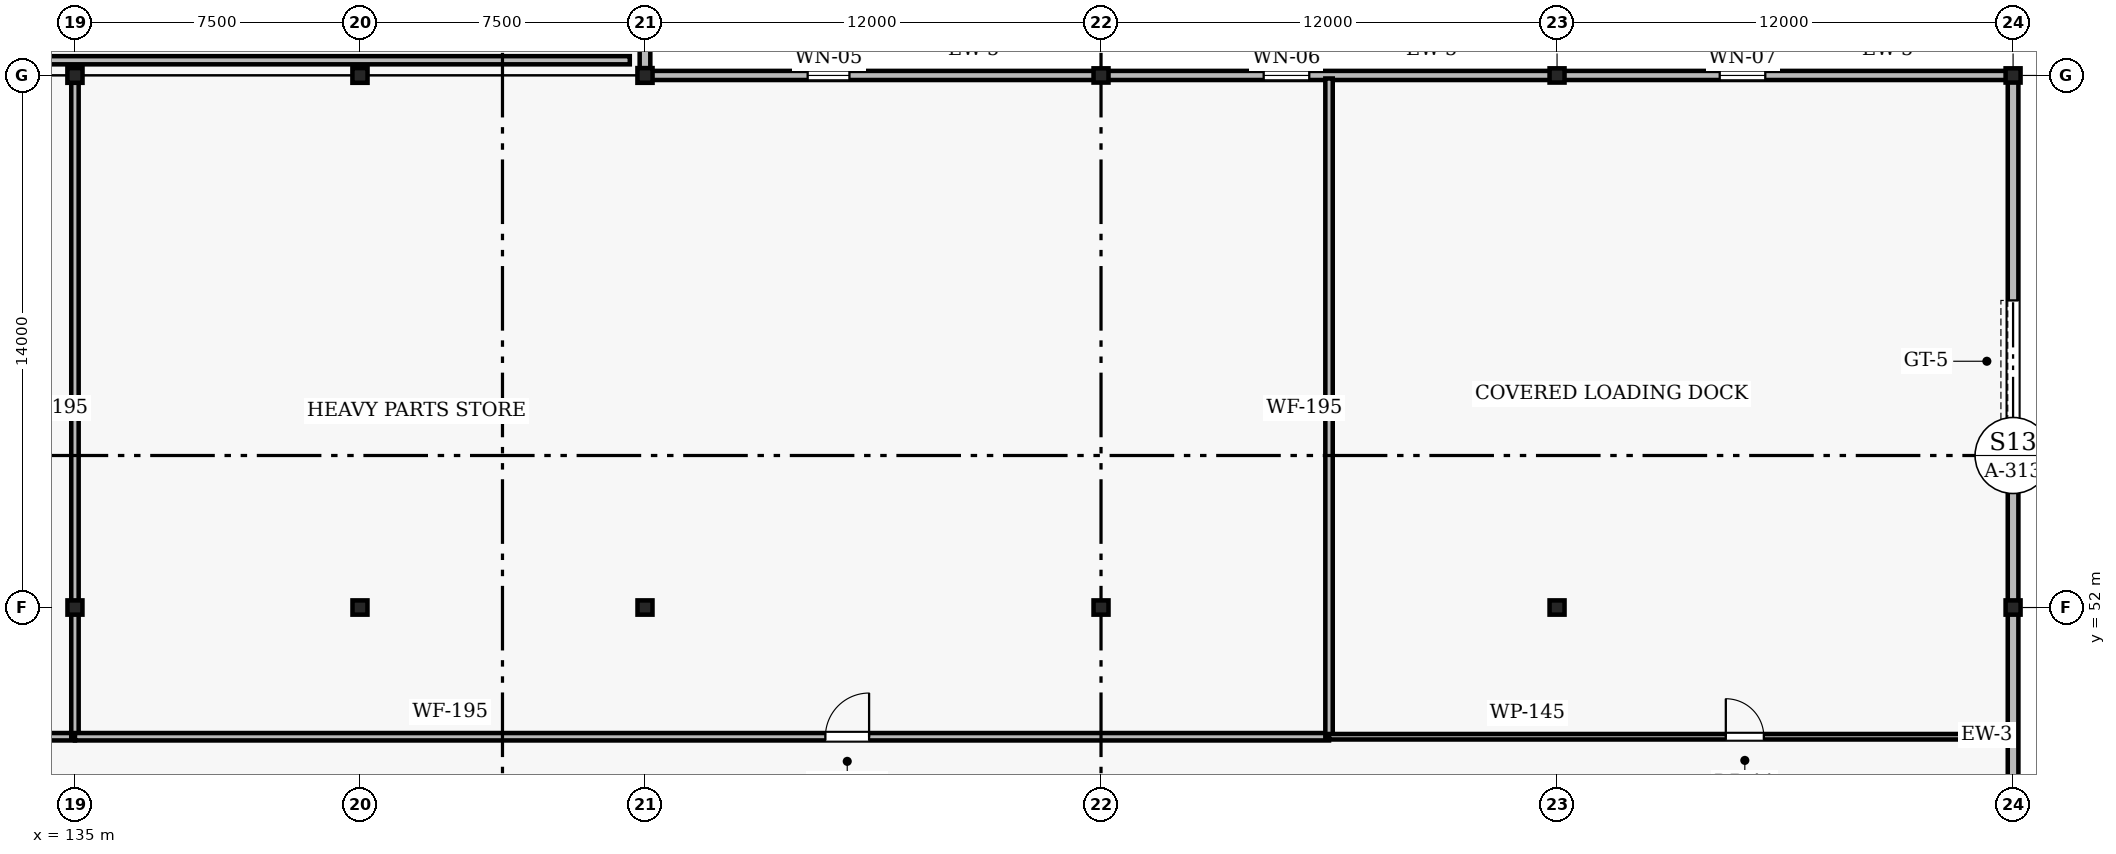
"""IFC4 building model, lengths in metres.
Left out: names, types, materials, properties, quantities, classifications, styles, units other than length and angle.
Written with IfcOpenShell. Run it as: python <this file> out.ifc"""

import sys

from ifc_helpers import new_model, si_unit, direction, frame, frame_2d, origin, origin_2d, place, context, subcontext, project, spatial, rectangle, i_section, extrude, element, fill, save


model = new_model("IFC4")
c1 = context("Model", 3, precision=1e-05, world=origin(), true_north=direction((0.0, 1.0)))
c2 = subcontext(c1, "Body", "Model", "MODEL_VIEW")
j1 = project(units=[si_unit("LENGTHUNIT", "METRE"), si_unit("PLANEANGLEUNIT", "RADIAN")], contexts=[c1])
p1 = place(None, origin())
s1 = spatial("IfcSite", under=j1, at=p1, CompositionType="ELEMENT")
p2 = place(p1, origin())
s2 = spatial("IfcBuilding", under=s1, at=p2, CompositionType="ELEMENT")
p3 = place(p2, origin())
s3 = spatial("IfcBuildingStorey", under=s2, at=p3, CompositionType="ELEMENT", Elevation=0.0)
p4 = place(p3, frame((135.0, 52.0, 0.0), z_axis=(0.0, 0.0, 1.0), x_axis=(1.0, 0.0, 0.0)))
e1 = element("IfcColumn", 1, at=p4, inside=s3, PredefinedType="COLUMN", context=c2, shape_type="SweptSolid", body=[
    extrude(i_section(OverallWidth=0.394, OverallDepth=0.375, WebThickness=0.021, FlangeThickness=0.033, FilletRadius=0.018, at=origin_2d()), origin(), (0.0, 0.0, 1.0), 4.5),
])
p5 = place(p3, frame((135.0, 66.0, 0.0), z_axis=(0.0, 0.0, 1.0), x_axis=(1.0, 0.0, 0.0)))
e2 = element("IfcColumn", 2, at=p5, inside=s3, PredefinedType="COLUMN", context=c2, shape_type="SweptSolid", body=[
    extrude(i_section(OverallWidth=0.398, OverallDepth=0.387, WebThickness=0.024, FlangeThickness=0.04, FilletRadius=0.018, at=origin_2d()), origin(), (0.0, 0.0, 1.0), 4.5),
])
p6 = place(p3, frame((142.5, 52.0, 0.0), z_axis=(0.0, 0.0, 1.0), x_axis=(1.0, 0.0, 0.0)))
e3 = element("IfcColumn", 3, at=p6, inside=s3, PredefinedType="COLUMN", context=c2, shape_type="SweptSolid", body=[
    extrude(i_section(OverallWidth=0.394, OverallDepth=0.375, WebThickness=0.021, FlangeThickness=0.033, FilletRadius=0.018, at=origin_2d()), origin(), (0.0, 0.0, 1.0), 4.5),
])
p7 = place(p3, frame((142.5, 66.0, 0.0), z_axis=(0.0, 0.0, 1.0), x_axis=(1.0, 0.0, 0.0)))
e4 = element("IfcColumn", 4, at=p7, inside=s3, PredefinedType="COLUMN", context=c2, shape_type="SweptSolid", body=[
    extrude(i_section(OverallWidth=0.398, OverallDepth=0.387, WebThickness=0.024, FlangeThickness=0.04, FilletRadius=0.018, at=origin_2d()), origin(), (0.0, 0.0, 1.0), 4.5),
])
p8 = place(p3, frame((150.0, 52.0, 0.0), z_axis=(0.0, 0.0, 1.0), x_axis=(1.0, 0.0, 0.0)))
e5 = element("IfcColumn", 5, at=p8, inside=s3, PredefinedType="COLUMN", context=c2, shape_type="SweptSolid", body=[
    extrude(i_section(OverallWidth=0.394, OverallDepth=0.375, WebThickness=0.021, FlangeThickness=0.033, FilletRadius=0.018, at=origin_2d()), origin(), (0.0, 0.0, 1.0), 4.5),
])
p9 = place(p3, frame((150.0, 66.0, 0.0), z_axis=(0.0, 0.0, 1.0), x_axis=(1.0, 0.0, 0.0)))
e6 = element("IfcColumn", 6, at=p9, inside=s3, PredefinedType="COLUMN", context=c2, shape_type="SweptSolid", body=[
    extrude(i_section(OverallWidth=0.398, OverallDepth=0.387, WebThickness=0.024, FlangeThickness=0.04, FilletRadius=0.018, at=origin_2d()), origin(), (0.0, 0.0, 1.0), 4.5),
])
for number, where, z_axis, x_axis in (
    (7, (162.0, 52.0, 0.0), (0.0, 0.0, 1.0), (1.0, 0.0, 0.0)),
    (8, (162.0, 66.0, 0.0), (0.0, 0.0, 1.0), (1.0, 0.0, 0.0)),
    (9, (174.0, 52.0, 0.0), (0.0, 0.0, 1.0), (1.0, 0.0, 0.0)),
    (10, (174.0, 66.0, 0.0), (0.0, 0.0, 1.0), (1.0, 0.0, 0.0)),
    (11, (186.0, 52.0, 0.0), (0.0, 0.0, 1.0), (1.0, 0.0, 0.0)),
    (12, (186.0, 66.0, 0.0), (0.0, 0.0, 1.0), (1.0, 0.0, 0.0)),
):
    element("IfcColumn", number, at=place(p3, frame(where, z_axis=z_axis, x_axis=x_axis)), inside=s3, PredefinedType="COLUMN", context=c2, shape_type="SweptSolid", body=[
        extrude(i_section(OverallWidth=0.394, OverallDepth=0.375, WebThickness=0.021, FlangeThickness=0.033, FilletRadius=0.018, at=origin_2d()), origin(), (0.0, 0.0, 1.0), 4.5),
    ])
p10 = place(p3, frame((150.0, 66.08, 0.0), z_axis=(0.0, 0.0, 1.0), x_axis=(0.0, 1.0, 0.0)))
e13 = element("IfcWall", 13, at=p10, inside=s3, PredefinedType="SOLIDWALL", context=c2, shape_type="SweptSolid", body=[
    extrude(rectangle(XDim=5.92, YDim=0.28, at=frame_2d((2.96, 0.0))), origin(), (0.0, 0.0, 1.0), 3.65),
])
p11 = place(p10, frame((1.18, 0.0, 0.0)))
e14 = element("IfcOpeningElement", 14, at=p11, cuts=e13, PredefinedType="OPENING", context=c2, shape_type="SweptSolid", body=[
    extrude(rectangle(XDim=3.2, YDim=3.1, at=frame_2d((1.6, 1.55))), frame((0.0, 0.15, 0.0), z_axis=(0.0, -1.0, 0.0), x_axis=(1.0, 0.0, 0.0)), (0.0, 0.0, 1.0), 0.3),
])
p12 = place(p3, frame((186.0, 38.08, 0.0), z_axis=(0.0, 0.0, 1.0), x_axis=(0.0, 1.0, 0.0)))
e15 = element("IfcWall", 15, at=p12, inside=s3, PredefinedType="SOLIDWALL", context=c2, shape_type="SweptSolid", body=[
    extrude(rectangle(XDim=13.84, YDim=0.28, at=frame_2d((6.92, 0.0))), origin(), (0.0, 0.0, 1.0), 3.633),
])
p13 = place(p12, frame((5.5, 0.0, 0.0)))
e16 = element("IfcOpeningElement", 16, at=p13, cuts=e15, PredefinedType="OPENING", context=c2, shape_type="SweptSolid", body=[
    extrude(rectangle(XDim=1.8, YDim=2.2, at=frame_2d((0.9, 1.1))), frame((0.0, 0.15, 0.0), z_axis=(0.0, -1.0, 0.0), x_axis=(1.0, 0.0, 0.0)), (0.0, 0.0, 1.0), 0.3),
])
p14 = place(p3, frame((186.0, 52.08, 0.0), z_axis=(0.0, 0.0, 1.0), x_axis=(0.0, 1.0, 0.0)))
e17 = element("IfcWall", 17, at=p14, inside=s3, PredefinedType="SOLIDWALL", context=c2, shape_type="SweptSolid", body=[
    extrude(rectangle(XDim=13.84, YDim=0.28, at=frame_2d((6.92, 0.0))), origin(), (0.0, 0.0, 1.0), 3.633),
])
p15 = place(p14, frame((4.8, 0.0, 0.0)))
e18 = element("IfcOpeningElement", 18, at=p15, cuts=e17, PredefinedType="OPENING", context=c2, shape_type="SweptSolid", body=[
    extrude(rectangle(XDim=3.2, YDim=3.1, at=frame_2d((1.6, 1.55))), frame((0.0, 0.15, 0.0), z_axis=(0.0, -1.0, 0.0), x_axis=(1.0, 0.0, 0.0)), (0.0, 0.0, 1.0), 0.3),
])
p16 = place(p3, frame((150.08, 66.0, 0.0), z_axis=(0.0, 0.0, 1.0), x_axis=(1.0, 0.0, 0.0)))
e19 = element("IfcWall", 19, at=p16, inside=s3, PredefinedType="SOLIDWALL", context=c2, shape_type="SweptSolid", body=[
    extrude(rectangle(XDim=11.84, YDim=0.24, at=frame_2d((5.92, 0.0))), origin(), (0.0, 0.0, 1.0), 3.785),
])
p17 = place(p16, frame((4.2, 0.0, 1.15)))
e20 = element("IfcOpeningElement", 20, at=p17, cuts=e19, PredefinedType="OPENING", context=c2, shape_type="SweptSolid", body=[
    extrude(rectangle(XDim=1.1, YDim=1.5, at=frame_2d((0.55, 0.75))), frame((0.0, 0.13, 0.0), z_axis=(0.0, -1.0, 0.0), x_axis=(1.0, 0.0, 0.0)), (0.0, 0.0, 1.0), 0.26),
])
p18 = place(p3, frame((162.08, 66.0, 0.0), z_axis=(0.0, 0.0, 1.0), x_axis=(1.0, 0.0, 0.0)))
e21 = element("IfcWall", 21, at=p18, inside=s3, PredefinedType="SOLIDWALL", context=c2, shape_type="SweptSolid", body=[
    extrude(rectangle(XDim=11.84, YDim=0.24, at=frame_2d((5.92, 0.0))), origin(), (0.0, 0.0, 1.0), 3.785),
])
p19 = place(p18, frame((4.2, 0.0, 1.15)))
e22 = element("IfcOpeningElement", 22, at=p19, cuts=e21, PredefinedType="OPENING", context=c2, shape_type="SweptSolid", body=[
    extrude(rectangle(XDim=1.2, YDim=1.1, at=frame_2d((0.6, 0.55))), frame((0.0, 0.13, 0.0), z_axis=(0.0, -1.0, 0.0), x_axis=(1.0, 0.0, 0.0)), (0.0, 0.0, 1.0), 0.26),
])
p20 = place(p3, frame((174.08, 66.0, 0.0), z_axis=(0.0, 0.0, 1.0), x_axis=(1.0, 0.0, 0.0)))
e23 = element("IfcWall", 23, at=p20, inside=s3, PredefinedType="SOLIDWALL", context=c2, shape_type="SweptSolid", body=[
    extrude(rectangle(XDim=11.84, YDim=0.24, at=frame_2d((5.92, 0.0))), origin(), (0.0, 0.0, 1.0), 3.785),
])
p21 = place(p20, frame((4.2, 0.0, 1.15)))
e24 = element("IfcOpeningElement", 24, at=p21, cuts=e23, PredefinedType="OPENING", context=c2, shape_type="SweptSolid", body=[
    extrude(rectangle(XDim=1.2, YDim=1.35, at=frame_2d((0.6, 0.675))), frame((0.0, 0.13, 0.0), z_axis=(0.0, -1.0, 0.0), x_axis=(1.0, 0.0, 0.0)), (0.0, 0.0, 1.0), 0.26),
])
p22 = place(p3, frame((90.0, 66.4, 0.0), z_axis=(0.0, 0.0, 1.0), x_axis=(1.0, 0.0, 0.0)))
e25 = element("IfcWall", 25, at=p22, inside=s3, PredefinedType="PARTITIONING", context=c2, shape_type="SweptSolid", body=[
    extrude(rectangle(XDim=59.6, YDim=0.215, at=frame_2d((29.8, 0.0))), origin(), (0.0, 0.0, 1.0), 3.7),
])
p23 = place(p22, frame((36.239, 0.0, 0.0)))
e26 = element("IfcOpeningElement", 26, at=p23, cuts=e25, PredefinedType="OPENING", context=c2, shape_type="SweptSolid", body=[
    extrude(rectangle(XDim=1.15, YDim=2.15, at=frame_2d((0.575, 1.075))), frame((0.0, 0.117, 0.0), z_axis=(0.0, -1.0, 0.0), x_axis=(1.0, 0.0, 0.0)), (0.0, 0.0, 1.0), 0.235),
])
p24 = place(p3, frame((105.16, 48.6, 0.0), z_axis=(0.0, 0.0, 1.0), x_axis=(1.0, 0.0, 0.0)))
e27 = element("IfcWall", 27, at=p24, inside=s3, PredefinedType="PARTITIONING", context=c2, shape_type="SweptSolid", body=[
    extrude(rectangle(XDim=29.84, YDim=0.195, at=frame_2d((14.92, 0.0))), origin(), (0.0, 0.0, 1.0), 3.7),
])
p25 = place(p24, frame((17.788, 0.0, 0.0)))
e28 = element("IfcOpeningElement", 28, at=p25, cuts=e27, PredefinedType="OPENING", context=c2, shape_type="SweptSolid", body=[
    extrude(rectangle(XDim=1.15, YDim=2.15, at=frame_2d((0.575, 1.075))), frame((0.0, 0.107, 0.0), z_axis=(0.0, -1.0, 0.0), x_axis=(1.0, 0.0, 0.0)), (0.0, 0.0, 1.0), 0.215),
])
p26 = place(p3, frame((135.0, 48.6, 0.0), z_axis=(0.0, 0.0, 1.0), x_axis=(0.0, 1.0, 0.0)))
e29 = element("IfcWall", 29, at=p26, inside=s3, PredefinedType="PARTITIONING", context=c2, shape_type="SweptSolid", body=[
    extrude(rectangle(XDim=17.32, YDim=0.195, at=frame_2d((8.66, 0.0))), origin(), (0.0, 0.0, 1.0), 3.633),
])
p27 = place(p3, frame((135.0, 48.6, 0.0), z_axis=(0.0, 0.0, 1.0), x_axis=(1.0, 0.0, 0.0)))
e30 = element("IfcWall", 30, at=p27, inside=s3, PredefinedType="PARTITIONING", context=c2, shape_type="SweptSolid", body=[
    extrude(rectangle(XDim=33.0, YDim=0.195, at=frame_2d((16.5, 0.0))), origin(), (0.0, 0.0, 1.0), 3.7),
])
p28 = place(p27, frame((19.747, 0.0, 0.0)))
e31 = element("IfcOpeningElement", 31, at=p28, cuts=e30, PredefinedType="OPENING", context=c2, shape_type="SweptSolid", body=[
    extrude(rectangle(XDim=1.15, YDim=2.15, at=frame_2d((0.575, 1.075))), frame((0.0, 0.107, 0.0), z_axis=(0.0, -1.0, 0.0), x_axis=(1.0, 0.0, 0.0)), (0.0, 0.0, 1.0), 0.215),
])
p29 = place(p3, frame((168.0, 48.6, 0.0), z_axis=(0.0, 0.0, 1.0), x_axis=(0.0, 1.0, 0.0)))
e32 = element("IfcWall", 32, at=p29, inside=s3, PredefinedType="PARTITIONING", context=c2, shape_type="SweptSolid", body=[
    extrude(rectangle(XDim=17.32, YDim=0.195, at=frame_2d((8.66, 0.0))), origin(), (0.0, 0.0, 1.0), 3.7),
])
p30 = place(p3, frame((168.0, 48.6, 0.0), z_axis=(0.0, 0.0, 1.0), x_axis=(1.0, 0.0, 0.0)))
e33 = element("IfcWall", 33, at=p30, inside=s3, PredefinedType="PARTITIONING", context=c2, shape_type="SweptSolid", body=[
    extrude(rectangle(XDim=17.84, YDim=0.145, at=frame_2d((8.92, 0.0))), origin(), (0.0, 0.0, 1.0), 3.7),
])
p31 = place(p30, frame((10.441, 0.0, 0.0)))
e34 = element("IfcOpeningElement", 34, at=p31, cuts=e33, PredefinedType="OPENING", context=c2, shape_type="SweptSolid", body=[
    extrude(rectangle(XDim=1.0, YDim=2.14, at=frame_2d((0.5, 1.07))), frame((0.0, 0.083, 0.0), z_axis=(0.0, -1.0, 0.0), x_axis=(1.0, 0.0, 0.0)), (0.0, 0.0, 1.0), 0.165),
])
p32 = place(p15, origin())
e35 = element("IfcDoor", 35, at=p32, inside=s3, OperationType="ROLLINGUP", PredefinedType="GATE", context=c2, shape_type="SweptSolid", body=[
    extrude(rectangle(XDim=3.2, YDim=3.1, at=frame_2d((1.6, 1.55))), frame((0.0, 0.025, 0.0), z_axis=(0.0, -1.0, 0.0), x_axis=(1.0, 0.0, 0.0)), (0.0, 0.0, 1.0), 0.05),
])
fill(e18, e35)
p33 = place(p17, origin())
e36 = element("IfcWindow", 36, at=p33, inside=s3, PartitioningType="SINGLE_PANEL", PredefinedType="WINDOW", context=c2, shape_type="SweptSolid", body=[
    extrude(rectangle(XDim=1.1, YDim=1.5, at=frame_2d((0.55, 0.75))), frame((0.0, 0.03, 0.0), z_axis=(0.0, -1.0, 0.0), x_axis=(1.0, 0.0, 0.0)), (0.0, 0.0, 1.0), 0.06),
])
fill(e20, e36)
p34 = place(p19, origin())
e37 = element("IfcWindow", 37, at=p34, inside=s3, PartitioningType="SINGLE_PANEL", PredefinedType="WINDOW", context=c2, shape_type="SweptSolid", body=[
    extrude(rectangle(XDim=1.2, YDim=1.1, at=frame_2d((0.6, 0.55))), frame((0.0, 0.03, 0.0), z_axis=(0.0, -1.0, 0.0), x_axis=(1.0, 0.0, 0.0)), (0.0, 0.0, 1.0), 0.06),
])
fill(e22, e37)
p35 = place(p21, origin())
e38 = element("IfcWindow", 38, at=p35, inside=s3, PartitioningType="SINGLE_PANEL", PredefinedType="WINDOW", context=c2, shape_type="SweptSolid", body=[
    extrude(rectangle(XDim=1.2, YDim=1.35, at=frame_2d((0.6, 0.675))), frame((0.0, 0.03, 0.0), z_axis=(0.0, -1.0, 0.0), x_axis=(1.0, 0.0, 0.0)), (0.0, 0.0, 1.0), 0.06),
])
fill(e24, e38)
p36 = place(p28, origin())
e39 = element("IfcDoor", 39, at=p36, inside=s3, OperationType="SINGLE_SWING_RIGHT", PredefinedType="DOOR", context=c2, shape_type="SweptSolid", body=[
    extrude(rectangle(XDim=1.15, YDim=2.15, at=frame_2d((0.575, 1.075))), frame((0.0, 0.025, 0.0), z_axis=(0.0, -1.0, 0.0), x_axis=(1.0, 0.0, 0.0)), (0.0, 0.0, 1.0), 0.05),
])
fill(e31, e39)
p37 = place(p31, origin())
e40 = element("IfcDoor", 40, at=p37, inside=s3, OperationType="SINGLE_SWING_LEFT", PredefinedType="DOOR", context=c2, shape_type="SweptSolid", body=[
    extrude(rectangle(XDim=1.0, YDim=2.14, at=frame_2d((0.5, 1.07))), frame((0.0, 0.025, 0.0), z_axis=(0.0, -1.0, 0.0), x_axis=(1.0, 0.0, 0.0)), (0.0, 0.0, 1.0), 0.05),
])
fill(e34, e40)
save(model, sys.argv[1])
